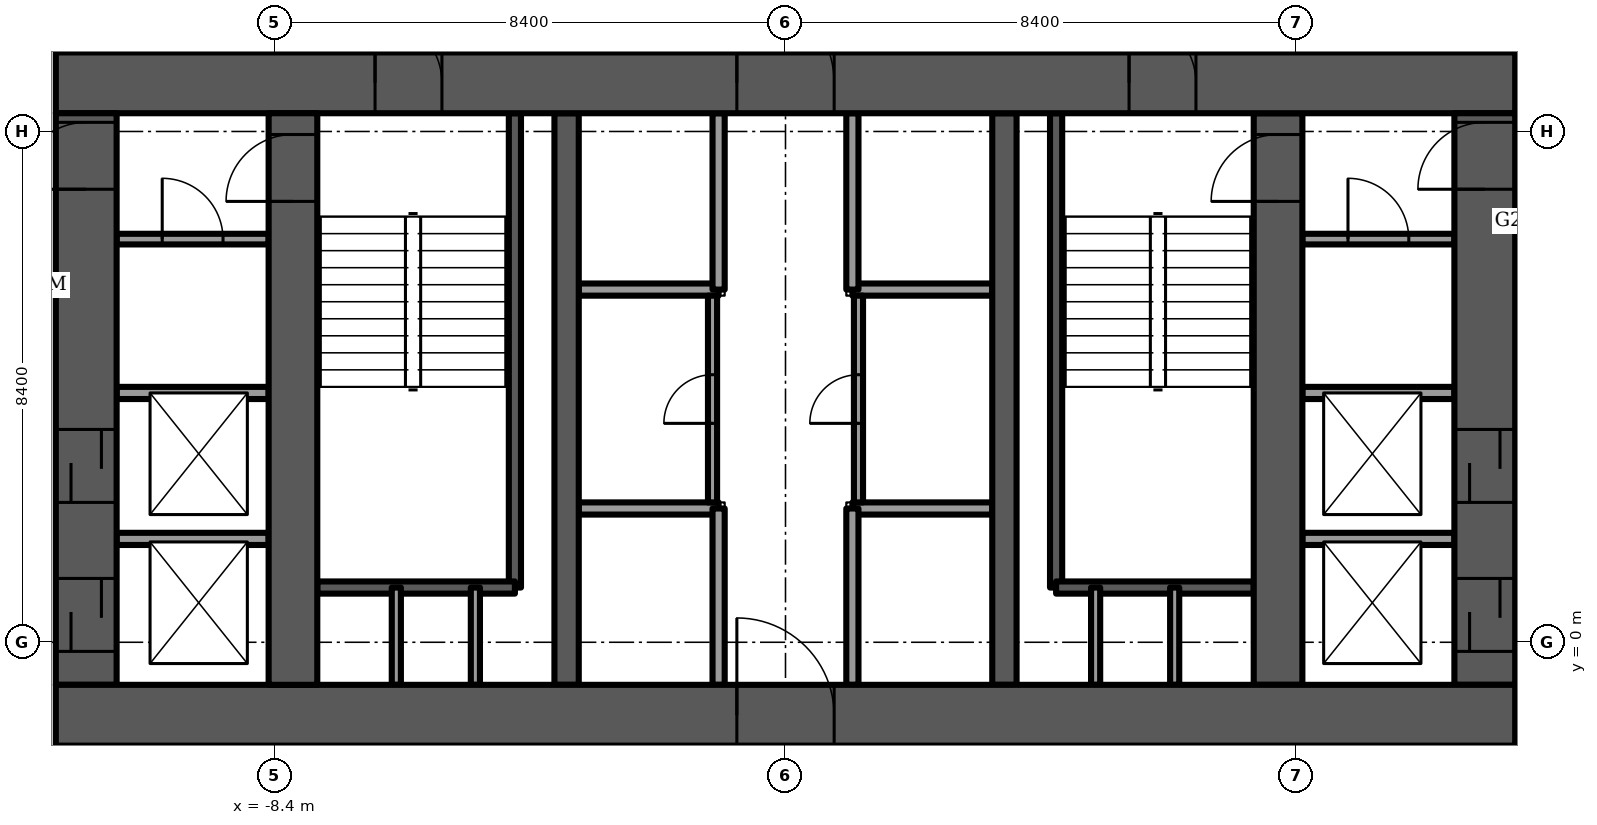
"""IFC4 building model, lengths in metres.
Left out: names, types, materials, properties, quantities, classifications, styles, units other than length and angle.
Written with IfcOpenShell. Run it as: python <this file> out.ifc"""

import sys

from ifc_helpers import new_model, si_unit, direction, frame, frame_2d, origin, place, context, subcontext, project, spatial, rectangle, extrude, element, fill, save


model = new_model("IFC4")
c1 = context("Model", 3, precision=1e-05, world=origin(), true_north=direction((0.0, 1.0)))
c2 = subcontext(c1, "Body", "Model", "MODEL_VIEW")
j1 = project(units=[si_unit("LENGTHUNIT", "METRE"), si_unit("PLANEANGLEUNIT", "RADIAN")], contexts=[c1])
p1 = place(None, origin())
s1 = spatial("IfcSite", under=j1, at=p1, CompositionType="ELEMENT")
p2 = place(p1, origin())
s2 = spatial("IfcBuilding", under=s1, at=p2, CompositionType="ELEMENT")
p3 = place(p2, frame((0.0, 0.0, 100.5)))
s3 = spatial("IfcBuildingStorey", under=s2, at=p3, CompositionType="ELEMENT", Elevation=100.5)
p4 = place(p3, frame((-12.0, -1.2, -0.3), z_axis=(0.0, 0.0, 1.0), x_axis=(1.0, 0.0, 0.0)))
e1 = element("IfcWall", 1, at=p4, inside=s3, PredefinedType="SHEAR", context=c2, shape_type="SweptSolid", body=[
    extrude(rectangle(XDim=24.0, YDim=1.0, at=frame_2d((12.0, 0.0))), origin(), (0.0, 0.0, 1.0), 3.75),
])
p5 = place(p4, frame((11.2, 0.0, 0.0)))
e2 = element("IfcOpeningElement", 2, at=p5, cuts=e1, PredefinedType="OPENING", context=c2, shape_type="SweptSolid", body=[
    extrude(rectangle(XDim=1.6, YDim=2.1, at=frame_2d((0.8, 1.05))), frame((0.0, 0.5, 0.0), z_axis=(0.0, -1.0, 0.0), x_axis=(1.0, 0.0, 0.0)), (0.0, 0.0, 1.0), 1.0),
])
p6 = place(p3, frame((-12.0, 9.2, -0.3), z_axis=(0.0, 0.0, 1.0), x_axis=(1.0, 0.0, 0.0)))
e3 = element("IfcWall", 3, at=p6, inside=s3, PredefinedType="SHEAR", context=c2, shape_type="SweptSolid", body=[
    extrude(rectangle(XDim=24.0, YDim=1.0, at=frame_2d((12.0, 0.0))), origin(), (0.0, 0.0, 1.0), 3.75),
])
p7 = place(p6, frame((11.2, 0.0, 0.0)))
e4 = element("IfcOpeningElement", 4, at=p7, cuts=e3, PredefinedType="OPENING", context=c2, shape_type="SweptSolid", body=[
    extrude(rectangle(XDim=1.6, YDim=2.1, at=frame_2d((0.8, 1.05))), frame((0.0, 0.5, 0.0), z_axis=(0.0, -1.0, 0.0), x_axis=(1.0, 0.0, 0.0)), (0.0, 0.0, 1.0), 1.0),
])
p8 = place(p6, frame((5.25, 0.0, 0.0)))
e5 = element("IfcOpeningElement", 5, at=p8, cuts=e3, PredefinedType="OPENING", context=c2, shape_type="SweptSolid", body=[
    extrude(rectangle(XDim=1.1, YDim=2.1, at=frame_2d((0.55, 1.05))), frame((0.0, 0.5, 0.0), z_axis=(0.0, -1.0, 0.0), x_axis=(1.0, 0.0, 0.0)), (0.0, 0.0, 1.0), 1.0),
])
p9 = place(p6, frame((17.65, 0.0, 0.0)))
e6 = element("IfcOpeningElement", 6, at=p9, cuts=e3, PredefinedType="OPENING", context=c2, shape_type="SweptSolid", body=[
    extrude(rectangle(XDim=1.1, YDim=2.1, at=frame_2d((0.55, 1.05))), frame((0.0, 0.5, 0.0), z_axis=(0.0, -1.0, 0.0), x_axis=(1.0, 0.0, 0.0)), (0.0, 0.0, 1.0), 1.0),
])
p10 = place(p3, frame((-8.1, -0.7, -0.3), z_axis=(0.0, 0.0, 1.0), x_axis=(0.0, 1.0, 0.0)))
e7 = element("IfcWall", 7, at=p10, inside=s3, PredefinedType="SHEAR", context=c2, shape_type="SweptSolid", body=[
    extrude(rectangle(XDim=9.4, YDim=0.8, at=frame_2d((4.7, 0.0))), origin(), (0.0, 0.0, 1.0), 3.75),
])
p11 = place(p10, frame((7.95, 0.0, 0.0)))
e8 = element("IfcOpeningElement", 8, at=p11, cuts=e7, PredefinedType="OPENING", context=c2, shape_type="SweptSolid", body=[
    extrude(rectangle(XDim=1.1, YDim=2.1, at=frame_2d((0.55, 1.05))), frame((0.0, 0.4, 0.0), z_axis=(0.0, -1.0, 0.0), x_axis=(1.0, 0.0, 0.0)), (0.0, 0.0, 1.0), 0.8),
])
p12 = place(p3, frame((8.1, -0.7, -0.3), z_axis=(0.0, 0.0, 1.0), x_axis=(0.0, 1.0, 0.0)))
e9 = element("IfcWall", 9, at=p12, inside=s3, PredefinedType="SHEAR", context=c2, shape_type="SweptSolid", body=[
    extrude(rectangle(XDim=9.4, YDim=0.8, at=frame_2d((4.7, 0.0))), origin(), (0.0, 0.0, 1.0), 3.75),
])
p13 = place(p12, frame((7.95, 0.0, 0.0)))
e10 = element("IfcOpeningElement", 10, at=p13, cuts=e9, PredefinedType="OPENING", context=c2, shape_type="SweptSolid", body=[
    extrude(rectangle(XDim=1.1, YDim=2.1, at=frame_2d((0.55, 1.05))), frame((0.0, 0.4, 0.0), z_axis=(0.0, -1.0, 0.0), x_axis=(1.0, 0.0, 0.0)), (0.0, 0.0, 1.0), 0.8),
])
for number, where, z_axis, x_axis in (
    (11, (-3.6, -0.7, -0.3), (0.0, 0.0, 1.0), (0.0, 1.0, 0.0)),
    (12, (3.6, -0.7, -0.3), (0.0, 0.0, 1.0), (0.0, 1.0, 0.0)),
):
    element("IfcWall", number, at=place(p3, frame(where, z_axis=z_axis, x_axis=x_axis)), inside=s3, PredefinedType="SHEAR", context=c2, shape_type="SweptSolid", body=[
        extrude(rectangle(XDim=9.4, YDim=0.4, at=frame_2d((4.7, 0.0))), origin(), (0.0, 0.0, 1.0), 3.75),
    ])
p14 = place(p3, frame((-11.5, -0.7, -0.3), z_axis=(0.0, 0.0, 1.0), x_axis=(0.0, 1.0, 0.0)))
e13 = element("IfcWall", 13, at=p14, inside=s3, PredefinedType="SHEAR", context=c2, shape_type="SweptSolid", body=[
    extrude(rectangle(XDim=9.4, YDim=1.0, at=frame_2d((4.7, 0.0))), origin(), (0.0, 0.0, 1.0), 3.75),
])
p15 = place(p14, frame((8.15, 0.0, 0.0)))
e14 = element("IfcOpeningElement", 14, at=p15, cuts=e13, PredefinedType="OPENING", context=c2, shape_type="SweptSolid", body=[
    extrude(rectangle(XDim=1.1, YDim=2.1, at=frame_2d((0.55, 1.05))), frame((0.0, 0.5, 0.0), z_axis=(0.0, -1.0, 0.0), x_axis=(1.0, 0.0, 0.0)), (0.0, 0.0, 1.0), 1.0),
])
p16 = place(p14, frame((0.55, 0.0, 0.0)))
e15 = element("IfcOpeningElement", 15, at=p16, cuts=e13, PredefinedType="OPENING", context=c2, shape_type="SweptSolid", body=[
    extrude(rectangle(XDim=1.2, YDim=2.1, at=frame_2d((0.6, 1.05))), frame((0.0, 0.5, 0.0), z_axis=(0.0, -1.0, 0.0), x_axis=(1.0, 0.0, 0.0)), (0.0, 0.0, 1.0), 1.0),
])
p17 = place(p14, frame((3.0, 0.0, 0.0)))
e16 = element("IfcOpeningElement", 16, at=p17, cuts=e13, PredefinedType="OPENING", context=c2, shape_type="SweptSolid", body=[
    extrude(rectangle(XDim=1.2, YDim=2.1, at=frame_2d((0.6, 1.05))), frame((0.0, 0.5, 0.0), z_axis=(0.0, -1.0, 0.0), x_axis=(1.0, 0.0, 0.0)), (0.0, 0.0, 1.0), 1.0),
])
p18 = place(p3, frame((11.5, -0.7, -0.3), z_axis=(0.0, 0.0, 1.0), x_axis=(0.0, 1.0, 0.0)))
e17 = element("IfcWall", 17, at=p18, inside=s3, PredefinedType="SHEAR", context=c2, shape_type="SweptSolid", body=[
    extrude(rectangle(XDim=9.4, YDim=1.0, at=frame_2d((4.7, 0.0))), origin(), (0.0, 0.0, 1.0), 3.75),
])
p19 = place(p18, frame((8.15, 0.0, 0.0)))
e18 = element("IfcOpeningElement", 18, at=p19, cuts=e17, PredefinedType="OPENING", context=c2, shape_type="SweptSolid", body=[
    extrude(rectangle(XDim=1.1, YDim=2.1, at=frame_2d((0.55, 1.05))), frame((0.0, 0.5, 0.0), z_axis=(0.0, -1.0, 0.0), x_axis=(1.0, 0.0, 0.0)), (0.0, 0.0, 1.0), 1.0),
])
p20 = place(p18, frame((0.55, 0.0, 0.0)))
e19 = element("IfcOpeningElement", 19, at=p20, cuts=e17, PredefinedType="OPENING", context=c2, shape_type="SweptSolid", body=[
    extrude(rectangle(XDim=1.2, YDim=2.1, at=frame_2d((0.6, 1.05))), frame((0.0, 0.5, 0.0), z_axis=(0.0, -1.0, 0.0), x_axis=(1.0, 0.0, 0.0)), (0.0, 0.0, 1.0), 1.0),
])
p21 = place(p18, frame((3.0, 0.0, 0.0)))
e20 = element("IfcOpeningElement", 20, at=p21, cuts=e17, PredefinedType="OPENING", context=c2, shape_type="SweptSolid", body=[
    extrude(rectangle(XDim=1.2, YDim=2.1, at=frame_2d((0.6, 1.05))), frame((0.0, 0.5, 0.0), z_axis=(0.0, -1.0, 0.0), x_axis=(1.0, 0.0, 0.0)), (0.0, 0.0, 1.0), 1.0),
])
for number, where, z_axis, x_axis in (
    (21, (-3.4, 2.2, 0.0), (0.0, 0.0, 1.0), (1.0, 0.0, 0.0)),
    (22, (-3.4, 5.8, 0.0), (0.0, 0.0, 1.0), (1.0, 0.0, 0.0)),
    (23, (1.1, 2.2, 0.0), (0.0, 0.0, 1.0), (1.0, 0.0, 0.0)),
    (24, (1.1, 5.8, 0.0), (0.0, 0.0, 1.0), (1.0, 0.0, 0.0)),
):
    element("IfcWall", number, at=place(p3, frame(where, z_axis=z_axis, x_axis=x_axis)), inside=s3, PredefinedType="PARTITIONING", context=c2, shape_type="SweptSolid", body=[
        extrude(rectangle(XDim=2.3, YDim=0.2, at=frame_2d((1.15, 0.0))), origin(), (0.0, 0.0, 1.0), 3.45),
    ])
for number, where, z_axis, x_axis in (
    (25, (-1.1, -0.7, 0.0), (0.0, 0.0, 1.0), (0.0, 1.0, 0.0)),
    (26, (1.1, -0.7, 0.0), (0.0, 0.0, 1.0), (0.0, 1.0, 0.0)),
    (27, (-1.1, 5.8, 0.0), (0.0, 0.0, 1.0), (0.0, 1.0, 0.0)),
    (28, (1.1, 5.8, 0.0), (0.0, 0.0, 1.0), (0.0, 1.0, 0.0)),
):
    element("IfcWall", number, at=place(p3, frame(where, z_axis=z_axis, x_axis=x_axis)), inside=s3, PredefinedType="PARTITIONING", context=c2, shape_type="SweptSolid", body=[
        extrude(rectangle(XDim=2.9, YDim=0.2, at=frame_2d((1.45, 0.0))), origin(), (0.0, 0.0, 1.0), 3.45),
    ])
p22 = place(p3, frame((-4.45, 0.9, -0.3), z_axis=(0.0, 0.0, 1.0), x_axis=(0.0, 1.0, 0.0)))
e29 = element("IfcWall", 29, at=p22, inside=s3, PredefinedType="SOLIDWALL", context=c2, shape_type="SweptSolid", body=[
    extrude(rectangle(XDim=7.8, YDim=0.2, at=frame_2d((3.9, 0.0))), origin(), (0.0, 0.0, 1.0), 3.75),
])
p23 = place(p3, frame((-7.7, 0.9, -0.3), z_axis=(0.0, 0.0, 1.0), x_axis=(1.0, 0.0, 0.0)))
e30 = element("IfcWall", 30, at=p23, inside=s3, PredefinedType="SOLIDWALL", context=c2, shape_type="SweptSolid", body=[
    extrude(rectangle(XDim=3.25, YDim=0.2, at=frame_2d((1.625, 0.0))), origin(), (0.0, 0.0, 1.0), 3.75),
])
for number, where, z_axis, x_axis in (
    (31, (-6.4, -0.7, 0.0), (0.0, 0.0, 1.0), (0.0, 1.0, 0.0)),
    (32, (-5.1, -0.7, 0.0), (0.0, 0.0, 1.0), (0.0, 1.0, 0.0)),
):
    element("IfcWall", number, at=place(p3, frame(where, z_axis=z_axis, x_axis=x_axis)), inside=s3, PredefinedType="PARTITIONING", context=c2, shape_type="SweptSolid", body=[
        extrude(rectangle(XDim=1.6, YDim=0.15, at=frame_2d((0.8, 0.0))), origin(), (0.0, 0.0, 1.0), 3.45),
    ])
p24 = place(p3, frame((4.45, 0.9, -0.3), z_axis=(0.0, 0.0, 1.0), x_axis=(0.0, 1.0, 0.0)))
e33 = element("IfcWall", 33, at=p24, inside=s3, PredefinedType="SOLIDWALL", context=c2, shape_type="SweptSolid", body=[
    extrude(rectangle(XDim=7.8, YDim=0.2, at=frame_2d((3.9, 0.0))), origin(), (0.0, 0.0, 1.0), 3.75),
])
p25 = place(p3, frame((4.45, 0.9, -0.3), z_axis=(0.0, 0.0, 1.0), x_axis=(1.0, 0.0, 0.0)))
e34 = element("IfcWall", 34, at=p25, inside=s3, PredefinedType="SOLIDWALL", context=c2, shape_type="SweptSolid", body=[
    extrude(rectangle(XDim=3.25, YDim=0.2, at=frame_2d((1.625, 0.0))), origin(), (0.0, 0.0, 1.0), 3.75),
])
for number, where, z_axis, x_axis in (
    (35, (5.1, -0.7, 0.0), (0.0, 0.0, 1.0), (0.0, 1.0, 0.0)),
    (36, (6.4, -0.7, 0.0), (0.0, 0.0, 1.0), (0.0, 1.0, 0.0)),
):
    element("IfcWall", number, at=place(p3, frame(where, z_axis=z_axis, x_axis=x_axis)), inside=s3, PredefinedType="PARTITIONING", context=c2, shape_type="SweptSolid", body=[
        extrude(rectangle(XDim=1.6, YDim=0.15, at=frame_2d((0.8, 0.0))), origin(), (0.0, 0.0, 1.0), 3.45),
    ])
p26 = place(p3, frame((-1.2, 2.3, 0.0), z_axis=(0.0, 0.0, 1.0), x_axis=(0.0, 1.0, 0.0)))
e37 = element("IfcWall", 37, at=p26, inside=s3, PredefinedType="PARTITIONING", context=c2, shape_type="SweptSolid", body=[
    extrude(rectangle(XDim=3.4, YDim=0.15, at=frame_2d((1.7, 0.0))), origin(), (0.0, 0.0, 1.0), 3.45),
])
p27 = place(p26, frame((1.3, 0.0, 0.0)))
e38 = element("IfcOpeningElement", 38, at=p27, cuts=e37, PredefinedType="OPENING", context=c2, shape_type="SweptSolid", body=[
    extrude(rectangle(XDim=0.8, YDim=2.1, at=frame_2d((0.4, 1.05))), frame((0.0, 0.075, 0.0), z_axis=(0.0, -1.0, 0.0), x_axis=(1.0, 0.0, 0.0)), (0.0, 0.0, 1.0), 0.15),
])
p28 = place(p3, frame((1.2, 2.3, 0.0), z_axis=(0.0, 0.0, 1.0), x_axis=(0.0, 1.0, 0.0)))
e39 = element("IfcWall", 39, at=p28, inside=s3, PredefinedType="PARTITIONING", context=c2, shape_type="SweptSolid", body=[
    extrude(rectangle(XDim=3.4, YDim=0.15, at=frame_2d((1.7, 0.0))), origin(), (0.0, 0.0, 1.0), 3.45),
])
p29 = place(p28, frame((1.3, 0.0, 0.0)))
e40 = element("IfcOpeningElement", 40, at=p29, cuts=e39, PredefinedType="OPENING", context=c2, shape_type="SweptSolid", body=[
    extrude(rectangle(XDim=0.8, YDim=2.1, at=frame_2d((0.4, 1.05))), frame((0.0, 0.075, 0.0), z_axis=(0.0, -1.0, 0.0), x_axis=(1.0, 0.0, 0.0)), (0.0, 0.0, 1.0), 0.15),
])
for number, where, z_axis, x_axis in (
    (41, (-11.0, 1.7, 0.0), (0.0, 0.0, 1.0), (1.0, 0.0, 0.0)),
    (42, (-11.0, 4.1, 0.0), (0.0, 0.0, 1.0), (1.0, 0.0, 0.0)),
):
    element("IfcWall", number, at=place(p3, frame(where, z_axis=z_axis, x_axis=x_axis)), inside=s3, PredefinedType="PARTITIONING", context=c2, shape_type="SweptSolid", body=[
        extrude(rectangle(XDim=2.5, YDim=0.2, at=frame_2d((1.25, 0.0))), origin(), (0.0, 0.0, 1.0), 3.45),
    ])
p30 = place(p3, frame((-11.0, 6.63, 0.0), z_axis=(0.0, 0.0, 1.0), x_axis=(1.0, 0.0, 0.0)))
e43 = element("IfcWall", 43, at=p30, inside=s3, PredefinedType="PARTITIONING", context=c2, shape_type="SweptSolid", body=[
    extrude(rectangle(XDim=2.5, YDim=0.175, at=frame_2d((1.25, 0.0))), origin(), (0.0, 0.0, 1.0), 3.45),
])
p31 = place(p30, frame((0.75, 0.0, 0.0)))
e44 = element("IfcOpeningElement", 44, at=p31, cuts=e43, PredefinedType="OPENING", context=c2, shape_type="SweptSolid", body=[
    extrude(rectangle(XDim=1.0, YDim=2.1, at=frame_2d((0.5, 1.05))), frame((0.0, 0.087, 0.0), z_axis=(0.0, -1.0, 0.0), x_axis=(1.0, 0.0, 0.0)), (0.0, 0.0, 1.0), 0.175),
])
for number, where, z_axis, x_axis in (
    (45, (8.5, 1.7, 0.0), (0.0, 0.0, 1.0), (1.0, 0.0, 0.0)),
    (46, (8.5, 4.1, 0.0), (0.0, 0.0, 1.0), (1.0, 0.0, 0.0)),
):
    element("IfcWall", number, at=place(p3, frame(where, z_axis=z_axis, x_axis=x_axis)), inside=s3, PredefinedType="PARTITIONING", context=c2, shape_type="SweptSolid", body=[
        extrude(rectangle(XDim=2.5, YDim=0.2, at=frame_2d((1.25, 0.0))), origin(), (0.0, 0.0, 1.0), 3.45),
    ])
p32 = place(p3, frame((8.5, 6.63, 0.0), z_axis=(0.0, 0.0, 1.0), x_axis=(1.0, 0.0, 0.0)))
e47 = element("IfcWall", 47, at=p32, inside=s3, PredefinedType="PARTITIONING", context=c2, shape_type="SweptSolid", body=[
    extrude(rectangle(XDim=2.5, YDim=0.175, at=frame_2d((1.25, 0.0))), origin(), (0.0, 0.0, 1.0), 3.45),
])
p33 = place(p32, frame((0.75, 0.0, 0.0)))
e48 = element("IfcOpeningElement", 48, at=p33, cuts=e47, PredefinedType="OPENING", context=c2, shape_type="SweptSolid", body=[
    extrude(rectangle(XDim=1.0, YDim=2.1, at=frame_2d((0.5, 1.05))), frame((0.0, 0.087, 0.0), z_axis=(0.0, -1.0, 0.0), x_axis=(1.0, 0.0, 0.0)), (0.0, 0.0, 1.0), 0.175),
])
p34 = place(p5, origin())
e49 = element("IfcDoor", 49, at=p34, inside=s3, OperationType="DOUBLE_DOOR_SINGLE_SWING", PredefinedType="DOOR", context=c2, shape_type="SweptSolid", body=[
    extrude(rectangle(XDim=1.6, YDim=2.1, at=frame_2d((0.8, 1.05))), frame((0.0, 0.025, 0.0), z_axis=(0.0, -1.0, 0.0), x_axis=(1.0, 0.0, 0.0)), (0.0, 0.0, 1.0), 0.05),
])
fill(e2, e49)
p35 = place(p7, origin())
e50 = element("IfcDoor", 50, at=p35, inside=s3, OperationType="DOUBLE_DOOR_SINGLE_SWING", PredefinedType="DOOR", context=c2, shape_type="SweptSolid", body=[
    extrude(rectangle(XDim=1.6, YDim=2.1, at=frame_2d((0.8, 1.05))), frame((0.0, 0.025, 0.0), z_axis=(0.0, -1.0, 0.0), x_axis=(1.0, 0.0, 0.0)), (0.0, 0.0, 1.0), 0.05),
])
fill(e4, e50)
p36 = place(p8, origin())
e51 = element("IfcDoor", 51, at=p36, inside=s3, OperationType="SINGLE_SWING_LEFT", PredefinedType="DOOR", context=c2, shape_type="SweptSolid", body=[
    extrude(rectangle(XDim=1.1, YDim=2.1, at=frame_2d((0.55, 1.05))), frame((0.0, 0.025, 0.0), z_axis=(0.0, -1.0, 0.0), x_axis=(1.0, 0.0, 0.0)), (0.0, 0.0, 1.0), 0.05),
])
fill(e5, e51)
p37 = place(p11, origin())
e52 = element("IfcDoor", 52, at=p37, inside=s3, OperationType="SINGLE_SWING_RIGHT", PredefinedType="DOOR", context=c2, shape_type="SweptSolid", body=[
    extrude(rectangle(XDim=1.1, YDim=2.1, at=frame_2d((0.55, 1.05))), frame((0.0, 0.025, 0.0), z_axis=(0.0, -1.0, 0.0), x_axis=(1.0, 0.0, 0.0)), (0.0, 0.0, 1.0), 0.05),
])
fill(e8, e52)
p38 = place(p9, origin())
e53 = element("IfcDoor", 53, at=p38, inside=s3, OperationType="SINGLE_SWING_RIGHT", PredefinedType="DOOR", context=c2, shape_type="SweptSolid", body=[
    extrude(rectangle(XDim=1.1, YDim=2.1, at=frame_2d((0.55, 1.05))), frame((0.0, 0.025, 0.0), z_axis=(0.0, -1.0, 0.0), x_axis=(1.0, 0.0, 0.0)), (0.0, 0.0, 1.0), 0.05),
])
fill(e6, e53)
p39 = place(p13, origin())
e54 = element("IfcDoor", 54, at=p39, inside=s3, OperationType="SINGLE_SWING_LEFT", PredefinedType="DOOR", context=c2, shape_type="SweptSolid", body=[
    extrude(rectangle(XDim=1.1, YDim=2.1, at=frame_2d((0.55, 1.05))), frame((0.0, 0.025, 0.0), z_axis=(0.0, -1.0, 0.0), x_axis=(1.0, 0.0, 0.0)), (0.0, 0.0, 1.0), 0.05),
])
fill(e10, e54)
p40 = place(p27, origin())
e55 = element("IfcDoor", 55, at=p40, inside=s3, OperationType="SINGLE_SWING_LEFT", PredefinedType="DOOR", context=c2, shape_type="SweptSolid", body=[
    extrude(rectangle(XDim=0.8, YDim=2.1, at=frame_2d((0.4, 1.05))), frame((0.0, 0.025, 0.0), z_axis=(0.0, -1.0, 0.0), x_axis=(1.0, 0.0, 0.0)), (0.0, 0.0, 1.0), 0.05),
])
fill(e38, e55)
p41 = place(p29, origin())
e56 = element("IfcDoor", 56, at=p41, inside=s3, OperationType="SINGLE_SWING_RIGHT", PredefinedType="DOOR", context=c2, shape_type="SweptSolid", body=[
    extrude(rectangle(XDim=0.8, YDim=2.1, at=frame_2d((0.4, 1.05))), frame((0.0, 0.025, 0.0), z_axis=(0.0, -1.0, 0.0), x_axis=(1.0, 0.0, 0.0)), (0.0, 0.0, 1.0), 0.05),
])
fill(e40, e56)
p42 = place(p31, origin())
e57 = element("IfcDoor", 57, at=p42, inside=s3, OperationType="SINGLE_SWING_LEFT", PredefinedType="DOOR", context=c2, shape_type="SweptSolid", body=[
    extrude(rectangle(XDim=1.0, YDim=2.1, at=frame_2d((0.5, 1.05))), frame((0.0, 0.025, 0.0), z_axis=(0.0, -1.0, 0.0), x_axis=(1.0, 0.0, 0.0)), (0.0, 0.0, 1.0), 0.05),
])
fill(e44, e57)
p43 = place(p15, origin())
e58 = element("IfcDoor", 58, at=p43, inside=s3, OperationType="SINGLE_SWING_LEFT", PredefinedType="DOOR", context=c2, shape_type="SweptSolid", body=[
    extrude(rectangle(XDim=1.1, YDim=2.1, at=frame_2d((0.55, 1.05))), frame((0.0, 0.025, 0.0), z_axis=(0.0, -1.0, 0.0), x_axis=(1.0, 0.0, 0.0)), (0.0, 0.0, 1.0), 0.05),
])
fill(e14, e58)
p44 = place(p16, origin())
e59 = element("IfcDoor", 59, at=p44, inside=s3, OperationType="SLIDING_TO_LEFT", PredefinedType="DOOR", context=c2, shape_type="SweptSolid", body=[
    extrude(rectangle(XDim=1.2, YDim=2.1, at=frame_2d((0.6, 1.05))), frame((0.0, 0.025, 0.0), z_axis=(0.0, -1.0, 0.0), x_axis=(1.0, 0.0, 0.0)), (0.0, 0.0, 1.0), 0.05),
])
fill(e15, e59)
p45 = place(p17, origin())
e60 = element("IfcDoor", 60, at=p45, inside=s3, OperationType="SLIDING_TO_LEFT", PredefinedType="DOOR", context=c2, shape_type="SweptSolid", body=[
    extrude(rectangle(XDim=1.2, YDim=2.1, at=frame_2d((0.6, 1.05))), frame((0.0, 0.025, 0.0), z_axis=(0.0, -1.0, 0.0), x_axis=(1.0, 0.0, 0.0)), (0.0, 0.0, 1.0), 0.05),
])
fill(e16, e60)
p46 = place(p33, origin())
e61 = element("IfcDoor", 61, at=p46, inside=s3, OperationType="SINGLE_SWING_RIGHT", PredefinedType="DOOR", context=c2, shape_type="SweptSolid", body=[
    extrude(rectangle(XDim=1.0, YDim=2.1, at=frame_2d((0.5, 1.05))), frame((0.0, 0.025, 0.0), z_axis=(0.0, -1.0, 0.0), x_axis=(1.0, 0.0, 0.0)), (0.0, 0.0, 1.0), 0.05),
])
fill(e48, e61)
p47 = place(p19, origin())
e62 = element("IfcDoor", 62, at=p47, inside=s3, OperationType="SINGLE_SWING_RIGHT", PredefinedType="DOOR", context=c2, shape_type="SweptSolid", body=[
    extrude(rectangle(XDim=1.1, YDim=2.1, at=frame_2d((0.55, 1.05))), frame((0.0, 0.025, 0.0), z_axis=(0.0, -1.0, 0.0), x_axis=(1.0, 0.0, 0.0)), (0.0, 0.0, 1.0), 0.05),
])
fill(e18, e62)
p48 = place(p20, origin())
e63 = element("IfcDoor", 63, at=p48, inside=s3, OperationType="SLIDING_TO_LEFT", PredefinedType="DOOR", context=c2, shape_type="SweptSolid", body=[
    extrude(rectangle(XDim=1.2, YDim=2.1, at=frame_2d((0.6, 1.05))), frame((0.0, 0.025, 0.0), z_axis=(0.0, -1.0, 0.0), x_axis=(1.0, 0.0, 0.0)), (0.0, 0.0, 1.0), 0.05),
])
fill(e19, e63)
p49 = place(p21, origin())
e64 = element("IfcDoor", 64, at=p49, inside=s3, OperationType="SLIDING_TO_LEFT", PredefinedType="DOOR", context=c2, shape_type="SweptSolid", body=[
    extrude(rectangle(XDim=1.2, YDim=2.1, at=frame_2d((0.6, 1.05))), frame((0.0, 0.025, 0.0), z_axis=(0.0, -1.0, 0.0), x_axis=(1.0, 0.0, 0.0)), (0.0, 0.0, 1.0), 0.05),
])
fill(e20, e64)
save(model, sys.argv[1])
